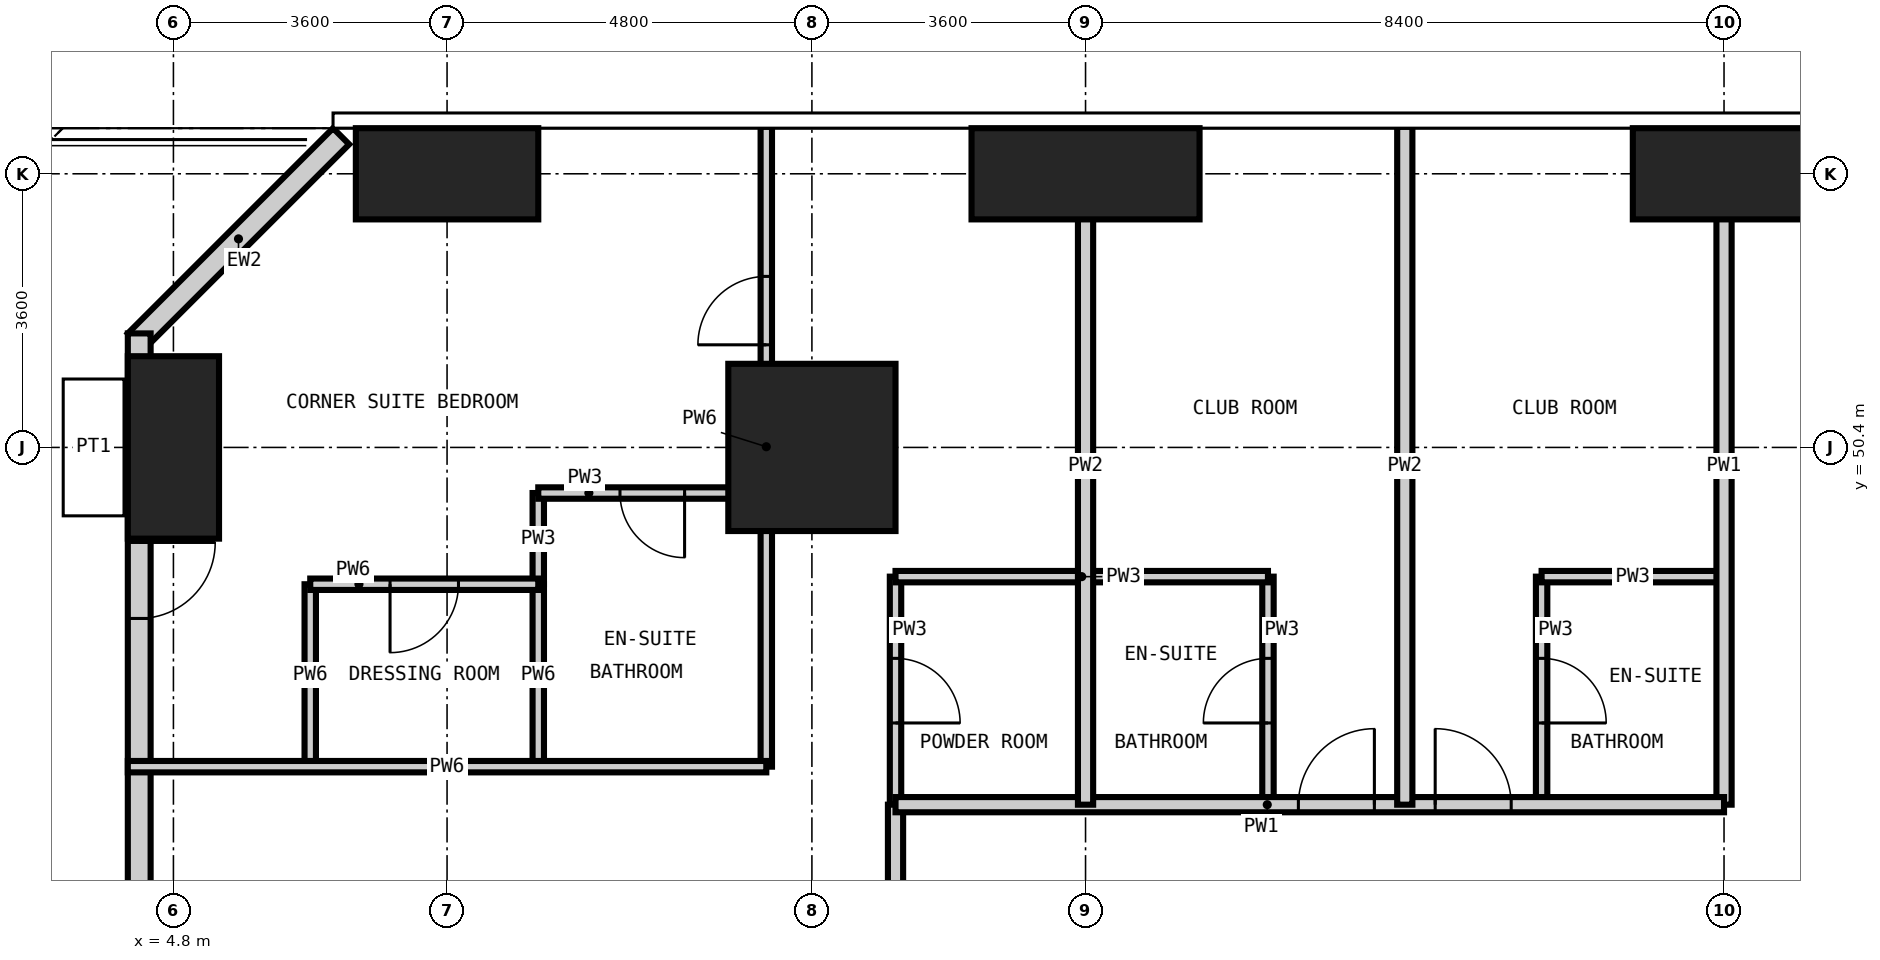
"""IFC4 building model, lengths in metres.
Left out: names, types, materials, properties, quantities, classifications, styles, units other than length and angle.
Written with IfcOpenShell. Run it as: python <this file> out.ifc"""

import sys

from ifc_helpers import new_model, si_unit, direction, frame, frame_2d, origin, origin_2d, place, context, subcontext, project, spatial, rectangle, extrude, element, fill, save


model = new_model("IFC4")
c1 = context("Model", 3, precision=1e-05, world=origin(), true_north=direction((0.0, 1.0)))
c2 = subcontext(c1, "Body", "Model", "MODEL_VIEW")
j1 = project(units=[si_unit("LENGTHUNIT", "METRE"), si_unit("PLANEANGLEUNIT", "RADIAN")], contexts=[c1])
p1 = place(None, origin())
s1 = spatial("IfcSite", under=j1, at=p1, CompositionType="ELEMENT")
p2 = place(p1, origin())
s2 = spatial("IfcBuilding", under=s1, at=p2, CompositionType="ELEMENT")
p3 = place(p2, frame((0.0, 0.0, 159.0)))
s3 = spatial("IfcBuildingStorey", under=s2, at=p3, CompositionType="ELEMENT", Elevation=159.0)
p4 = place(p3, frame((4.8, 50.4, -0.35), z_axis=(0.0, 0.0, 1.0), x_axis=(1.0, 0.0, 0.0)))
e1 = element("IfcColumn", 1, at=p4, inside=s3, PredefinedType="COLUMN", context=c2, shape_type="SweptSolid", body=[
    extrude(rectangle(XDim=1.2, YDim=2.4, at=origin_2d()), origin(), (0.0, 0.0, 1.0), 3.6),
])
p5 = place(p3, frame((8.4, 54.0, -0.35), z_axis=(0.0, 0.0, 1.0), x_axis=(1.0, 0.0, 0.0)))
e2 = element("IfcColumn", 2, at=p5, inside=s3, PredefinedType="COLUMN", context=c2, shape_type="SweptSolid", body=[
    extrude(rectangle(XDim=2.4, YDim=1.2, at=origin_2d()), origin(), (0.0, 0.0, 1.0), 3.6),
])
p6 = place(p3, frame((13.2, 50.4, -0.35), z_axis=(0.0, 0.0, 1.0), x_axis=(1.0, 0.0, 0.0)))
e3 = element("IfcColumn", 3, at=p6, inside=s3, PredefinedType="COLUMN", context=c2, shape_type="SweptSolid", body=[
    extrude(rectangle(XDim=2.2, YDim=2.2, at=origin_2d()), origin(), (0.0, 0.0, 1.0), 3.6),
])
p7 = place(p3, frame((16.8, 54.0, -0.35), z_axis=(0.0, 0.0, 1.0), x_axis=(1.0, 0.0, 0.0)))
e4 = element("IfcColumn", 4, at=p7, inside=s3, PredefinedType="COLUMN", context=c2, shape_type="SweptSolid", body=[
    extrude(rectangle(XDim=3.0, YDim=1.2, at=origin_2d()), origin(), (0.0, 0.0, 1.0), 3.6),
])
p8 = place(p3, frame((25.2, 54.0, -0.35), z_axis=(0.0, 0.0, 1.0), x_axis=(1.0, 0.0, 0.0)))
e5 = element("IfcColumn", 5, at=p8, inside=s3, PredefinedType="COLUMN", context=c2, shape_type="SweptSolid", body=[
    extrude(rectangle(XDim=2.4, YDim=1.2, at=origin_2d()), origin(), (0.0, 0.0, 1.0), 3.6),
])
p9 = place(p3, frame((7.006, 54.494, 0.0), z_axis=(0.0, 0.0, 1.0), x_axis=(-0.707138748762, -0.707074812166, 0.0)))
e6 = element("IfcWall", 6, at=p9, inside=s3, PredefinedType="SOLIDWALL", context=c2, shape_type="SweptSolid", body=[
    extrude(rectangle(XDim=3.818, YDim=0.3, at=frame_2d((1.909, 0.0))), origin(), (0.0, 0.0, 1.0), 3.25),
])
p10 = place(p3, frame((4.35, 51.9, 0.0), z_axis=(0.0, 0.0, 1.0), x_axis=(0.0, -1.0, 0.0)))
e7 = element("IfcWall", 7, at=p10, inside=s3, PredefinedType="SOLIDWALL", context=c2, shape_type="SweptSolid", body=[
    extrude(rectangle(XDim=45.0, YDim=0.3, at=frame_2d((22.5, 0.0))), origin(), (0.0, 0.0, 1.0), 3.25),
])
p11 = place(p10, frame((41.25, 0.0, 0.0)))
e8 = element("IfcOpeningElement", 8, at=p11, cuts=e7, PredefinedType="OPENING", context=c2, shape_type="SweptSolid", body=[
    extrude(rectangle(XDim=1.0, YDim=2.4, at=frame_2d((0.5, 1.2))), frame((0.0, 0.16, 0.0), z_axis=(0.0, -1.0, 0.0), x_axis=(1.0, 0.0, 0.0)), (0.0, 0.0, 1.0), 0.32),
])
p12 = place(p10, frame((36.7, 0.0, 0.0)))
e9 = element("IfcOpeningElement", 9, at=p12, cuts=e7, PredefinedType="OPENING", context=c2, shape_type="SweptSolid", body=[
    extrude(rectangle(XDim=1.0, YDim=2.4, at=frame_2d((0.5, 1.2))), frame((0.0, 0.16, 0.0), z_axis=(0.0, -1.0, 0.0), x_axis=(1.0, 0.0, 0.0)), (0.0, 0.0, 1.0), 0.32),
])
p13 = place(p10, frame((32.5, 0.0, 0.0)))
e10 = element("IfcOpeningElement", 10, at=p13, cuts=e7, PredefinedType="OPENING", context=c2, shape_type="SweptSolid", body=[
    extrude(rectangle(XDim=1.0, YDim=2.4, at=frame_2d((0.5, 1.2))), frame((0.0, 0.16, 0.0), z_axis=(0.0, -1.0, 0.0), x_axis=(1.0, 0.0, 0.0)), (0.0, 0.0, 1.0), 0.32),
])
p14 = place(p10, frame((28.3, 0.0, 0.0)))
e11 = element("IfcOpeningElement", 11, at=p14, cuts=e7, PredefinedType="OPENING", context=c2, shape_type="SweptSolid", body=[
    extrude(rectangle(XDim=1.0, YDim=2.4, at=frame_2d((0.5, 1.2))), frame((0.0, 0.16, 0.0), z_axis=(0.0, -1.0, 0.0), x_axis=(1.0, 0.0, 0.0)), (0.0, 0.0, 1.0), 0.32),
])
p15 = place(p10, frame((24.1, 0.0, 0.0)))
e12 = element("IfcOpeningElement", 12, at=p15, cuts=e7, PredefinedType="OPENING", context=c2, shape_type="SweptSolid", body=[
    extrude(rectangle(XDim=1.0, YDim=2.4, at=frame_2d((0.5, 1.2))), frame((0.0, 0.16, 0.0), z_axis=(0.0, -1.0, 0.0), x_axis=(1.0, 0.0, 0.0)), (0.0, 0.0, 1.0), 0.32),
])
p16 = place(p10, frame((19.9, 0.0, 0.0)))
e13 = element("IfcOpeningElement", 13, at=p16, cuts=e7, PredefinedType="OPENING", context=c2, shape_type="SweptSolid", body=[
    extrude(rectangle(XDim=1.0, YDim=2.4, at=frame_2d((0.5, 1.2))), frame((0.0, 0.16, 0.0), z_axis=(0.0, -1.0, 0.0), x_axis=(1.0, 0.0, 0.0)), (0.0, 0.0, 1.0), 0.32),
])
p17 = place(p10, frame((15.7, 0.0, 0.0)))
e14 = element("IfcOpeningElement", 14, at=p17, cuts=e7, PredefinedType="OPENING", context=c2, shape_type="SweptSolid", body=[
    extrude(rectangle(XDim=1.0, YDim=2.4, at=frame_2d((0.5, 1.2))), frame((0.0, 0.16, 0.0), z_axis=(0.0, -1.0, 0.0), x_axis=(1.0, 0.0, 0.0)), (0.0, 0.0, 1.0), 0.32),
])
p18 = place(p10, frame((11.5, 0.0, 0.0)))
e15 = element("IfcOpeningElement", 15, at=p18, cuts=e7, PredefinedType="OPENING", context=c2, shape_type="SweptSolid", body=[
    extrude(rectangle(XDim=1.0, YDim=2.4, at=frame_2d((0.5, 1.2))), frame((0.0, 0.16, 0.0), z_axis=(0.0, -1.0, 0.0), x_axis=(1.0, 0.0, 0.0)), (0.0, 0.0, 1.0), 0.32),
])
p19 = place(p10, frame((7.3, 0.0, 0.0)))
e16 = element("IfcOpeningElement", 16, at=p19, cuts=e7, PredefinedType="OPENING", context=c2, shape_type="SweptSolid", body=[
    extrude(rectangle(XDim=1.0, YDim=2.4, at=frame_2d((0.5, 1.2))), frame((0.0, 0.16, 0.0), z_axis=(0.0, -1.0, 0.0), x_axis=(1.0, 0.0, 0.0)), (0.0, 0.0, 1.0), 0.32),
])
p20 = place(p10, frame((2.75, 0.0, 0.0)))
e17 = element("IfcOpeningElement", 17, at=p20, cuts=e7, PredefinedType="OPENING", context=c2, shape_type="SweptSolid", body=[
    extrude(rectangle(XDim=1.0, YDim=2.4, at=frame_2d((0.5, 1.2))), frame((0.0, 0.16, 0.0), z_axis=(0.0, -1.0, 0.0), x_axis=(1.0, 0.0, 0.0)), (0.0, 0.0, 1.0), 0.32),
])
p21 = place(p3, frame((9.6, 48.6, 0.0), z_axis=(0.0, 0.0, 1.0), x_axis=(0.0, 1.0, 0.0)))
e18 = element("IfcWall", 18, at=p21, inside=s3, PredefinedType="PARTITIONING", context=c2, shape_type="SweptSolid", body=[
    extrude(rectangle(XDim=1.2, YDim=0.15, at=frame_2d((0.6, 0.0))), origin(), (0.0, 0.0, 1.0), 3.25),
])
p22 = place(p3, frame((14.3, 45.7, 0.0), z_axis=(0.0, 0.0, 1.0), x_axis=(0.0, 1.0, 0.0)))
e19 = element("IfcWall", 19, at=p22, inside=s3, PredefinedType="PARTITIONING", context=c2, shape_type="SweptSolid", body=[
    extrude(rectangle(XDim=3.0, YDim=0.15, at=frame_2d((1.5, 0.0))), origin(), (0.0, 0.0, 1.0), 3.25),
])
p23 = place(p22, frame((1.075, 0.0, 0.0)))
e20 = element("IfcOpeningElement", 20, at=p23, cuts=e19, PredefinedType="OPENING", context=c2, shape_type="SweptSolid", body=[
    extrude(rectangle(XDim=0.85, YDim=2.1, at=frame_2d((0.425, 1.05))), frame((0.0, 0.085, 0.0), z_axis=(0.0, -1.0, 0.0), x_axis=(1.0, 0.0, 0.0)), (0.0, 0.0, 1.0), 0.17),
])
p24 = place(p3, frame((19.2, 45.7, 0.0), z_axis=(0.0, 0.0, 1.0), x_axis=(0.0, 1.0, 0.0)))
e21 = element("IfcWall", 21, at=p24, inside=s3, PredefinedType="PARTITIONING", context=c2, shape_type="SweptSolid", body=[
    extrude(rectangle(XDim=3.0, YDim=0.15, at=frame_2d((1.5, 0.0))), origin(), (0.0, 0.0, 1.0), 3.25),
])
p25 = place(p24, frame((1.075, 0.0, 0.0)))
e22 = element("IfcOpeningElement", 22, at=p25, cuts=e21, PredefinedType="OPENING", context=c2, shape_type="SweptSolid", body=[
    extrude(rectangle(XDim=0.85, YDim=2.1, at=frame_2d((0.425, 1.05))), frame((0.0, 0.085, 0.0), z_axis=(0.0, -1.0, 0.0), x_axis=(1.0, 0.0, 0.0)), (0.0, 0.0, 1.0), 0.17),
])
p26 = place(p3, frame((22.8, 45.7, 0.0), z_axis=(0.0, 0.0, 1.0), x_axis=(0.0, 1.0, 0.0)))
e23 = element("IfcWall", 23, at=p26, inside=s3, PredefinedType="PARTITIONING", context=c2, shape_type="SweptSolid", body=[
    extrude(rectangle(XDim=3.0, YDim=0.15, at=frame_2d((1.5, 0.0))), origin(), (0.0, 0.0, 1.0), 3.25),
])
p27 = place(p26, frame((1.075, 0.0, 0.0)))
e24 = element("IfcOpeningElement", 24, at=p27, cuts=e23, PredefinedType="OPENING", context=c2, shape_type="SweptSolid", body=[
    extrude(rectangle(XDim=0.85, YDim=2.1, at=frame_2d((0.425, 1.05))), frame((0.0, 0.085, 0.0), z_axis=(0.0, -1.0, 0.0), x_axis=(1.0, 0.0, 0.0)), (0.0, 0.0, 1.0), 0.17),
])
p28 = place(p3, frame((14.3, 48.7, 0.0), z_axis=(0.0, 0.0, 1.0), x_axis=(1.0, 0.0, 0.0)))
e25 = element("IfcWall", 25, at=p28, inside=s3, PredefinedType="PARTITIONING", context=c2, shape_type="SweptSolid", body=[
    extrude(rectangle(XDim=4.9, YDim=0.15, at=frame_2d((2.45, 0.0))), origin(), (0.0, 0.0, 1.0), 3.25),
])
p29 = place(p3, frame((22.8, 48.7, 0.0), z_axis=(0.0, 0.0, 1.0), x_axis=(1.0, 0.0, 0.0)))
e26 = element("IfcWall", 26, at=p29, inside=s3, PredefinedType="PARTITIONING", context=c2, shape_type="SweptSolid", body=[
    extrude(rectangle(XDim=2.4, YDim=0.15, at=frame_2d((1.2, 0.0))), origin(), (0.0, 0.0, 1.0), 3.25),
])
p30 = place(p3, frame((9.6, 49.8, 0.0), z_axis=(0.0, 0.0, 1.0), x_axis=(1.0, 0.0, 0.0)))
e27 = element("IfcWall", 27, at=p30, inside=s3, PredefinedType="PARTITIONING", context=c2, shape_type="SweptSolid", body=[
    extrude(rectangle(XDim=3.0, YDim=0.15, at=frame_2d((1.5, 0.0))), origin(), (0.0, 0.0, 1.0), 3.25),
])
p31 = place(p30, frame((1.075, 0.0, 0.0)))
e28 = element("IfcOpeningElement", 28, at=p31, cuts=e27, PredefinedType="OPENING", context=c2, shape_type="SweptSolid", body=[
    extrude(rectangle(XDim=0.85, YDim=2.1, at=frame_2d((0.425, 1.05))), frame((0.0, 0.085, 0.0), z_axis=(0.0, -1.0, 0.0), x_axis=(1.0, 0.0, 0.0)), (0.0, 0.0, 1.0), 0.17),
])
p32 = place(p3, frame((14.3, 14.3, 0.0), z_axis=(0.0, 0.0, 1.0), x_axis=(0.0, 1.0, 0.0)))
e29 = element("IfcWall", 29, at=p32, inside=s3, PredefinedType="PARTITIONING", context=c2, shape_type="SweptSolid", body=[
    extrude(rectangle(XDim=31.4, YDim=0.2, at=frame_2d((15.7, 0.0))), origin(), (0.0, 0.0, 1.0), 3.25),
])
p33 = place(p32, frame((8.3, 0.0, 0.0)))
e30 = element("IfcOpeningElement", 30, at=p33, cuts=e29, PredefinedType="OPENING", context=c2, shape_type="SweptSolid", body=[
    extrude(rectangle(XDim=1.0, YDim=2.2, at=frame_2d((0.5, 1.1))), frame((0.0, 0.11, 0.0), z_axis=(0.0, -1.0, 0.0), x_axis=(1.0, 0.0, 0.0)), (0.0, 0.0, 1.0), 0.22),
])
p34 = place(p32, frame((20.9, 0.0, 0.0)))
e31 = element("IfcOpeningElement", 31, at=p34, cuts=e29, PredefinedType="OPENING", context=c2, shape_type="SweptSolid", body=[
    extrude(rectangle(XDim=1.0, YDim=2.2, at=frame_2d((0.5, 1.1))), frame((0.0, 0.11, 0.0), z_axis=(0.0, -1.0, 0.0), x_axis=(1.0, 0.0, 0.0)), (0.0, 0.0, 1.0), 0.22),
])
p35 = place(p32, frame((0.35, 0.0, 0.0)))
e32 = element("IfcOpeningElement", 32, at=p35, cuts=e29, PredefinedType="OPENING", context=c2, shape_type="SweptSolid", body=[
    extrude(rectangle(XDim=1.0, YDim=2.2, at=frame_2d((0.5, 1.1))), frame((0.0, 0.11, 0.0), z_axis=(0.0, -1.0, 0.0), x_axis=(1.0, 0.0, 0.0)), (0.0, 0.0, 1.0), 0.22),
])
p36 = place(p32, frame((29.05, 0.0, 0.0)))
e33 = element("IfcOpeningElement", 33, at=p36, cuts=e29, PredefinedType="OPENING", context=c2, shape_type="SweptSolid", body=[
    extrude(rectangle(XDim=1.0, YDim=2.2, at=frame_2d((0.5, 1.1))), frame((0.0, 0.11, 0.0), z_axis=(0.0, -1.0, 0.0), x_axis=(1.0, 0.0, 0.0)), (0.0, 0.0, 1.0), 0.22),
])
p37 = place(p3, frame((25.2, 45.7, 0.0), z_axis=(0.0, 0.0, 1.0), x_axis=(0.0, 1.0, 0.0)))
e34 = element("IfcWall", 34, at=p37, inside=s3, PredefinedType="PARTITIONING", context=c2, shape_type="SweptSolid", body=[
    extrude(rectangle(XDim=8.918, YDim=0.2, at=frame_2d((4.459, 0.0))), origin(), (0.0, 0.0, 1.0), 3.25),
])
p38 = place(p3, frame((14.3, 45.7, 0.0), z_axis=(0.0, 0.0, 1.0), x_axis=(1.0, 0.0, 0.0)))
e35 = element("IfcWall", 35, at=p38, inside=s3, PredefinedType="PARTITIONING", context=c2, shape_type="SweptSolid", body=[
    extrude(rectangle(XDim=10.9, YDim=0.2, at=frame_2d((5.45, 0.0))), origin(), (0.0, 0.0, 1.0), 3.25),
])
p39 = place(p38, frame((5.3, 0.0, 0.0)))
e36 = element("IfcOpeningElement", 36, at=p39, cuts=e35, PredefinedType="OPENING", context=c2, shape_type="SweptSolid", body=[
    extrude(rectangle(XDim=1.0, YDim=2.2, at=frame_2d((0.5, 1.1))), frame((0.0, 0.11, 0.0), z_axis=(0.0, -1.0, 0.0), x_axis=(1.0, 0.0, 0.0)), (0.0, 0.0, 1.0), 0.22),
])
p40 = place(p38, frame((7.1, 0.0, 0.0)))
e37 = element("IfcOpeningElement", 37, at=p40, cuts=e35, PredefinedType="OPENING", context=c2, shape_type="SweptSolid", body=[
    extrude(rectangle(XDim=1.0, YDim=2.2, at=frame_2d((0.5, 1.1))), frame((0.0, 0.11, 0.0), z_axis=(0.0, -1.0, 0.0), x_axis=(1.0, 0.0, 0.0)), (0.0, 0.0, 1.0), 0.22),
])
for number, where, z_axis, x_axis in (
    (38, (16.8, 45.7, 0.0), (0.0, 0.0, 1.0), (0.0, 1.0, 0.0)),
    (39, (21.0, 45.7, 0.0), (0.0, 0.0, 1.0), (0.0, 1.0, 0.0)),
):
    element("IfcWall", number, at=place(p3, frame(where, z_axis=z_axis, x_axis=x_axis)), inside=s3, PredefinedType="PARTITIONING", context=c2, shape_type="SweptSolid", body=[
        extrude(rectangle(XDim=8.918, YDim=0.2, at=frame_2d((4.459, 0.0))), origin(), (0.0, 0.0, 1.0), 3.25),
    ])
for number, where, z_axis, x_axis in (
    (40, (6.6, 46.2, 0.0), (0.0, 0.0, 1.0), (0.0, 1.0, 0.0)),
    (41, (9.6, 46.2, 0.0), (0.0, 0.0, 1.0), (0.0, 1.0, 0.0)),
):
    element("IfcWall", number, at=place(p3, frame(where, z_axis=z_axis, x_axis=x_axis)), inside=s3, PredefinedType="PARTITIONING", context=c2, shape_type="SweptSolid", body=[
        extrude(rectangle(XDim=2.4, YDim=0.15, at=frame_2d((1.2, 0.0))), origin(), (0.0, 0.0, 1.0), 3.25),
    ])
p41 = place(p3, frame((12.6, 46.2, 0.0), z_axis=(0.0, 0.0, 1.0), x_axis=(0.0, 1.0, 0.0)))
e42 = element("IfcWall", 42, at=p41, inside=s3, PredefinedType="PARTITIONING", context=c2, shape_type="SweptSolid", body=[
    extrude(rectangle(XDim=8.418, YDim=0.15, at=frame_2d((4.209, 0.0))), origin(), (0.0, 0.0, 1.0), 3.25),
])
p42 = place(p41, frame((5.55, 0.0, 0.0)))
e43 = element("IfcOpeningElement", 43, at=p42, cuts=e42, PredefinedType="OPENING", context=c2, shape_type="SweptSolid", body=[
    extrude(rectangle(XDim=0.9, YDim=2.1, at=frame_2d((0.45, 1.05))), frame((0.0, 0.085, 0.0), z_axis=(0.0, -1.0, 0.0), x_axis=(1.0, 0.0, 0.0)), (0.0, 0.0, 1.0), 0.17),
])
p43 = place(p3, frame((4.2, 46.2, 0.0), z_axis=(0.0, 0.0, 1.0), x_axis=(1.0, 0.0, 0.0)))
e44 = element("IfcWall", 44, at=p43, inside=s3, PredefinedType="PARTITIONING", context=c2, shape_type="SweptSolid", body=[
    extrude(rectangle(XDim=8.4, YDim=0.15, at=frame_2d((4.2, 0.0))), origin(), (0.0, 0.0, 1.0), 3.25),
])
p44 = place(p3, frame((6.6, 48.6, 0.0), z_axis=(0.0, 0.0, 1.0), x_axis=(1.0, 0.0, 0.0)))
e45 = element("IfcWall", 45, at=p44, inside=s3, PredefinedType="PARTITIONING", context=c2, shape_type="SweptSolid", body=[
    extrude(rectangle(XDim=3.0, YDim=0.15, at=frame_2d((1.5, 0.0))), origin(), (0.0, 0.0, 1.0), 3.25),
])
p45 = place(p44, frame((1.05, 0.0, 0.0)))
e46 = element("IfcOpeningElement", 46, at=p45, cuts=e45, PredefinedType="OPENING", context=c2, shape_type="SweptSolid", body=[
    extrude(rectangle(XDim=0.9, YDim=2.1, at=frame_2d((0.45, 1.05))), frame((0.0, 0.085, 0.0), z_axis=(0.0, -1.0, 0.0), x_axis=(1.0, 0.0, 0.0)), (0.0, 0.0, 1.0), 0.17),
])
p46 = place(p20, origin())
e47 = element("IfcDoor", 47, at=p46, inside=s3, OperationType="SINGLE_SWING_LEFT", PredefinedType="DOOR", context=c2, shape_type="SweptSolid", body=[
    extrude(rectangle(XDim=1.0, YDim=2.4, at=frame_2d((0.5, 1.2))), frame((0.0, 0.025, 0.0), z_axis=(0.0, -1.0, 0.0), x_axis=(1.0, 0.0, 0.0)), (0.0, 0.0, 1.0), 0.05),
])
fill(e17, e47)
p47 = place(p39, origin())
e48 = element("IfcDoor", 48, at=p47, inside=s3, OperationType="SINGLE_SWING_RIGHT", PredefinedType="DOOR", context=c2, shape_type="SweptSolid", body=[
    extrude(rectangle(XDim=1.0, YDim=2.2, at=frame_2d((0.5, 1.1))), frame((0.0, 0.025, 0.0), z_axis=(0.0, -1.0, 0.0), x_axis=(1.0, 0.0, 0.0)), (0.0, 0.0, 1.0), 0.05),
])
fill(e36, e48)
p48 = place(p25, origin())
e49 = element("IfcDoor", 49, at=p48, inside=s3, OperationType="SINGLE_SWING_LEFT", PredefinedType="DOOR", context=c2, shape_type="SweptSolid", body=[
    extrude(rectangle(XDim=0.85, YDim=2.1, at=frame_2d((0.425, 1.05))), frame((0.0, 0.025, 0.0), z_axis=(0.0, -1.0, 0.0), x_axis=(1.0, 0.0, 0.0)), (0.0, 0.0, 1.0), 0.05),
])
fill(e22, e49)
p49 = place(p40, origin())
e50 = element("IfcDoor", 50, at=p49, inside=s3, OperationType="SINGLE_SWING_LEFT", PredefinedType="DOOR", context=c2, shape_type="SweptSolid", body=[
    extrude(rectangle(XDim=1.0, YDim=2.2, at=frame_2d((0.5, 1.1))), frame((0.0, 0.025, 0.0), z_axis=(0.0, -1.0, 0.0), x_axis=(1.0, 0.0, 0.0)), (0.0, 0.0, 1.0), 0.05),
])
fill(e37, e50)
p50 = place(p27, frame((0.85, 0.0, 0.0), z_axis=(0.0, 0.0, 1.0), x_axis=(-1.0, 0.0, 0.0)))
e51 = element("IfcDoor", 51, at=p50, inside=s3, OperationType="SINGLE_SWING_RIGHT", PredefinedType="DOOR", context=c2, shape_type="SweptSolid", body=[
    extrude(rectangle(XDim=0.85, YDim=2.1, at=frame_2d((0.425, 1.05))), frame((0.0, 0.025, 0.0), z_axis=(0.0, -1.0, 0.0), x_axis=(1.0, 0.0, 0.0)), (0.0, 0.0, 1.0), 0.05),
])
fill(e24, e51)
p51 = place(p23, frame((0.85, 0.0, 0.0), z_axis=(0.0, 0.0, 1.0), x_axis=(-1.0, 0.0, 0.0)))
e52 = element("IfcDoor", 52, at=p51, inside=s3, OperationType="SINGLE_SWING_RIGHT", PredefinedType="DOOR", context=c2, shape_type="SweptSolid", body=[
    extrude(rectangle(XDim=0.85, YDim=2.1, at=frame_2d((0.425, 1.05))), frame((0.0, 0.025, 0.0), z_axis=(0.0, -1.0, 0.0), x_axis=(1.0, 0.0, 0.0)), (0.0, 0.0, 1.0), 0.05),
])
fill(e20, e52)
p52 = place(p42, origin())
e53 = element("IfcDoor", 53, at=p52, inside=s3, OperationType="SINGLE_SWING_LEFT", PredefinedType="DOOR", context=c2, shape_type="SweptSolid", body=[
    extrude(rectangle(XDim=0.9, YDim=2.1, at=frame_2d((0.45, 1.05))), frame((0.0, 0.025, 0.0), z_axis=(0.0, -1.0, 0.0), x_axis=(1.0, 0.0, 0.0)), (0.0, 0.0, 1.0), 0.05),
])
fill(e43, e53)
p53 = place(p31, frame((0.85, 0.0, 0.0), z_axis=(0.0, 0.0, 1.0), x_axis=(-1.0, 0.0, 0.0)))
e54 = element("IfcDoor", 54, at=p53, inside=s3, OperationType="SINGLE_SWING_LEFT", PredefinedType="DOOR", context=c2, shape_type="SweptSolid", body=[
    extrude(rectangle(XDim=0.85, YDim=2.1, at=frame_2d((0.425, 1.05))), frame((0.0, 0.025, 0.0), z_axis=(0.0, -1.0, 0.0), x_axis=(1.0, 0.0, 0.0)), (0.0, 0.0, 1.0), 0.05),
])
fill(e28, e54)
p54 = place(p45, frame((0.9, 0.0, 0.0), z_axis=(0.0, 0.0, 1.0), x_axis=(-1.0, 0.0, 0.0)))
e55 = element("IfcDoor", 55, at=p54, inside=s3, OperationType="SINGLE_SWING_RIGHT", PredefinedType="DOOR", context=c2, shape_type="SweptSolid", body=[
    extrude(rectangle(XDim=0.9, YDim=2.1, at=frame_2d((0.45, 1.05))), frame((0.0, 0.025, 0.0), z_axis=(0.0, -1.0, 0.0), x_axis=(1.0, 0.0, 0.0)), (0.0, 0.0, 1.0), 0.05),
])
fill(e46, e55)
save(model, sys.argv[1])
